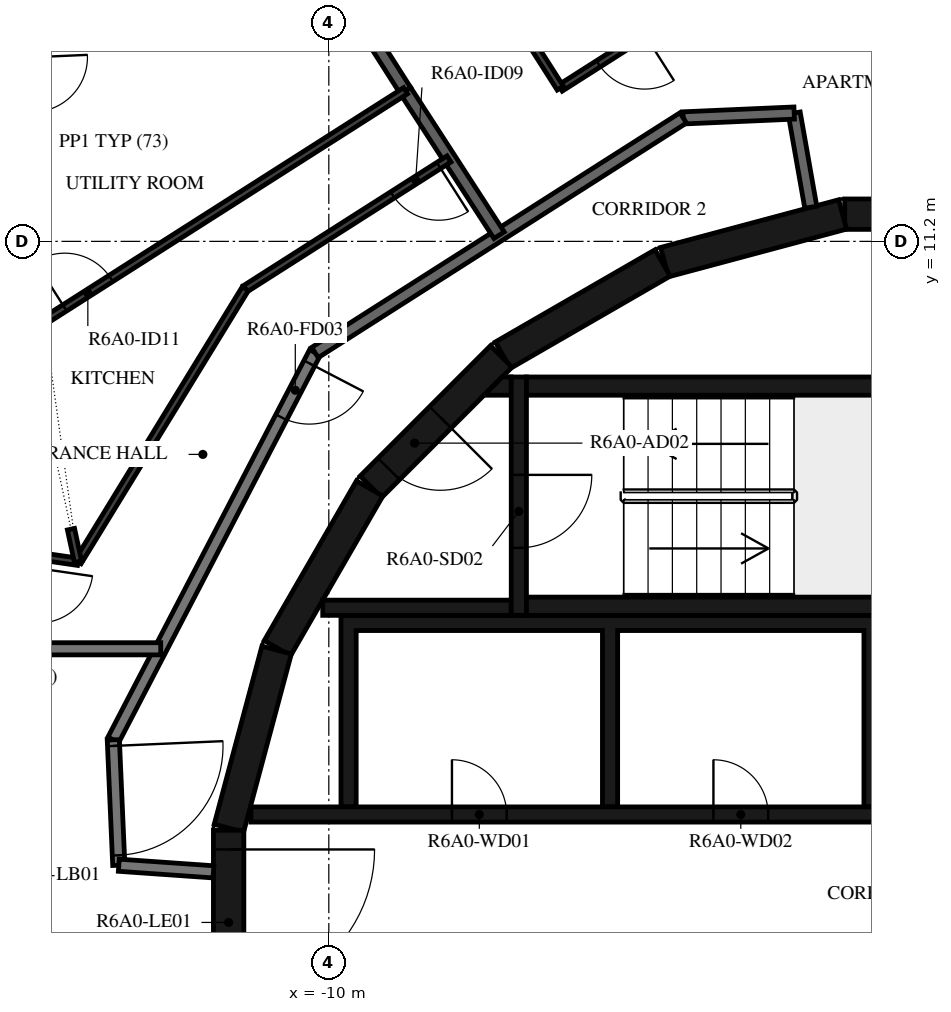
"""IFC4 building model, lengths in metres.
Left out: names, types, materials, properties, quantities, classifications, styles, units other than length and angle.
Written with IfcOpenShell. Run it as: python <this file> out.ifc"""

import sys

from ifc_helpers import new_model, si_unit, direction, frame, frame_2d, origin, place, context, subcontext, project, spatial, polyline, rectangle, outline, extrude, element, fill, save


model = new_model("IFC4")
c1 = context("Model", 3, precision=1e-05, world=origin(), true_north=direction((0.0, 1.0)))
c2 = subcontext(c1, "Body", "Model", "MODEL_VIEW")
j1 = project(units=[si_unit("LENGTHUNIT", "METRE"), si_unit("PLANEANGLEUNIT", "RADIAN")], contexts=[c1])
p1 = place(None, origin())
s1 = spatial("IfcSite", under=j1, at=p1, CompositionType="ELEMENT")
p2 = place(p1, origin())
s2 = spatial("IfcBuilding", under=s1, at=p2, CompositionType="ELEMENT")
p3 = place(p2, frame((0.0, 0.0, 233.7)))
s3 = spatial("IfcBuildingStorey", under=s2, at=p3, CompositionType="ELEMENT", Elevation=233.7)
for number, where, z_axis, x_axis in (
    (1, (1.516, 11.647, 0.0), (0.0, 0.0, 1.0), (-1.0, 0.0, 0.0)),
    (2, (-1.55, 11.643, 0.0), (0.0, 0.0, 1.0), (-0.966, -0.259, 0.0)),
    (3, (-4.51, 10.845, 0.0), (0.0, 0.0, 1.0), (-0.866, -0.5, 0.0)),
):
    element("IfcWall", number, at=place(p3, frame(where, z_axis=z_axis, x_axis=x_axis)), inside=s3, PredefinedType="SHEAR", context=c2, shape_type="SweptSolid", body=[
        extrude(rectangle(XDim=3.033, YDim=0.5, at=frame_2d((1.516, 0.0))), origin(), (0.0, 0.0, 1.0), 3.12),
    ])
p4 = place(p3, frame((-7.164, 9.308, 0.0), z_axis=(0.0, 0.0, 1.0), x_axis=(-0.707106781187, -0.707106781187, 0.0)))
e4 = element("IfcWall", 4, at=p4, inside=s3, PredefinedType="SHEAR", context=c2, shape_type="SweptSolid", body=[
    extrude(rectangle(XDim=3.032, YDim=0.5, at=frame_2d((1.516, 0.0))), origin(), (0.0, 0.0, 1.0), 3.12),
])
p5 = place(p4, frame((1.416, 0.0, 0.0)))
e5 = element("IfcOpeningElement", 5, at=p5, cuts=e4, PredefinedType="OPENING", context=c2, shape_type="SweptSolid", body=[
    extrude(rectangle(XDim=1.2, YDim=2.1, at=frame_2d((0.6, 1.05))), frame((0.0, 0.26, 0.0), z_axis=(0.0, -1.0, 0.0), x_axis=(1.0, 0.0, 0.0)), (0.0, 0.0, 1.0), 0.52),
])
for number, where, z_axis, x_axis in (
    (6, (-9.329, 7.137, 0.0), (0.0, 0.0, 1.0), (-0.5, -0.866, 0.0)),
    (7, (-10.858, 4.479, 0.0), (0.0, 0.0, 1.0), (-0.259, -0.966, 0.0)),
):
    element("IfcWall", number, at=place(p3, frame(where, z_axis=z_axis, x_axis=x_axis)), inside=s3, PredefinedType="SHEAR", context=c2, shape_type="SweptSolid", body=[
        extrude(rectangle(XDim=3.033, YDim=0.5, at=frame_2d((1.516, 0.0))), origin(), (0.0, 0.0, 1.0), 3.12),
    ])
p6 = place(p3, frame((-11.647, 1.516, 0.0), z_axis=(0.0, 0.0, 1.0), x_axis=(0.0, -1.0, 0.0)))
e8 = element("IfcWall", 8, at=p6, inside=s3, PredefinedType="SHEAR", context=c2, shape_type="SweptSolid", body=[
    extrude(rectangle(XDim=3.033, YDim=0.5, at=frame_2d((1.516, 0.0))), origin(), (0.0, 0.0, 1.0), 3.12),
])
p7 = place(p6, frame((0.316, 0.0, 0.0)))
e9 = element("IfcOpeningElement", 9, at=p7, cuts=e8, PredefinedType="OPENING", context=c2, shape_type="SweptSolid", body=[
    extrude(rectangle(XDim=2.4, YDim=2.1, at=frame_2d((1.2, 1.05))), frame((0.0, 0.26, 0.0), z_axis=(0.0, -1.0, 0.0), x_axis=(1.0, 0.0, 0.0)), (0.0, 0.0, 1.0), 0.52),
])
for number, where, z_axis, x_axis in (
    (10, (-6.75, 5.2, 0.0), (0.0, 0.0, 1.0), (1.0, 0.0, 0.0)),
    (11, (-6.75, 8.82, 0.0), (0.0, 0.0, 1.0), (1.0, 0.0, 0.0)),
):
    element("IfcWall", number, at=place(p3, frame(where, z_axis=z_axis, x_axis=x_axis)), inside=s3, PredefinedType="SHEAR", context=c2, shape_type="SweptSolid", body=[
        extrude(rectangle(XDim=6.75, YDim=0.3, at=frame_2d((3.375, 0.0))), origin(), (0.0, 0.0, 1.0), 3.12),
    ])
p8 = place(p3, frame((-6.875, 8.97, 0.0), z_axis=(0.0, 0.0, 1.0), x_axis=(0.0, -1.0, 0.0)))
e12 = element("IfcWall", 12, at=p8, inside=s3, PredefinedType="SHEAR", context=c2, shape_type="SweptSolid", body=[
    extrude(rectangle(XDim=3.92, YDim=0.25, at=frame_2d((1.96, 0.0))), origin(), (0.0, 0.0, 1.0), 3.12),
])
p9 = place(p8, frame((1.61, 0.0, 0.0)))
e13 = element("IfcOpeningElement", 13, at=p9, cuts=e12, PredefinedType="OPENING", context=c2, shape_type="SweptSolid", body=[
    extrude(rectangle(XDim=1.2, YDim=2.1, at=frame_2d((0.6, 1.05))), frame((0.0, 0.135, 0.0), z_axis=(0.0, -1.0, 0.0), x_axis=(1.0, 0.0, 0.0)), (0.0, 0.0, 1.0), 0.27),
])
p10 = place(p3, frame((-7.0, 5.175, 0.0), z_axis=(0.0, 0.0, 1.0), x_axis=(-1.0, 0.0, 0.0)))
e14 = element("IfcWall", 14, at=p10, inside=s3, PredefinedType="SHEAR", context=c2, shape_type="SweptSolid", body=[
    extrude(rectangle(XDim=3.1, YDim=0.25, at=frame_2d((1.55, 0.0))), origin(), (0.0, 0.0, 1.0), 3.12),
])
p11 = place(p3, origin())
e15 = element("IfcWall", 15, at=p11, inside=s3, PredefinedType="SHEAR", context=c2, shape_type="SweptSolid", body=[
    extrude(outline(polyline([(-7.148, 8.97), (-7.0, 8.97), (-7.0, 8.67), (-7.448, 8.67), (-7.148, 8.97)])), origin(), (0.0, 0.0, 1.0), 3.12),
])
p12 = place(p3, origin())
e16 = element("IfcWall", 16, at=p12, inside=s3, PredefinedType="SHEAR", context=c2, shape_type="SweptSolid", body=[
    extrude(outline(polyline([(-9.55, 4.8), (-5.5, 4.8), (-5.5, 1.9), (-5.25, 1.9), (-5.25, 4.8), (-1.2, 4.8), (-1.2, 1.9), (-0.95, 1.9), (-0.95, 4.8), (0.95, 4.8), (0.95, 1.9), (1.2, 1.9), (1.2, 4.8), (3.1, 4.8), (3.1, 1.9), (3.35, 1.9), (3.35, 4.8), (5.25, 4.8), (5.25, 1.9), (5.5, 1.9), (5.5, 4.8), (7.4, 4.8), (7.4, 1.9), (7.65, 1.9), (7.65, 4.8), (9.55, 4.8), (9.55, 1.9), (9.8, 1.9), (9.8, 4.8), (9.8, 5.05), (-9.8, 5.05), (-9.8, 4.8), (-9.8, 1.9), (-9.55, 1.9), (-9.55, 4.8)])), origin(), (0.0, 0.0, 1.0), 3.12),
])
p13 = place(p3, frame((-11.28, 1.775, 0.0), z_axis=(0.0, 0.0, 1.0), x_axis=(1.0, 0.0, 0.0)))
e17 = element("IfcWall", 17, at=p13, inside=s3, PredefinedType="SHEAR", context=c2, shape_type="SweptSolid", body=[
    extrude(rectangle(XDim=14.38, YDim=0.25, at=frame_2d((7.19, 0.0))), origin(), (0.0, 0.0, 1.0), 3.12),
])
p14 = place(p13, frame((10.73, 0.0, 0.0)))
e18 = element("IfcOpeningElement", 18, at=p14, cuts=e17, PredefinedType="OPENING", context=c2, shape_type="SweptSolid", body=[
    extrude(rectangle(XDim=1.1, YDim=2.1, at=frame_2d((0.55, 1.05))), frame((0.0, 0.135, 0.0), z_axis=(0.0, -1.0, 0.0), x_axis=(1.0, 0.0, 0.0)), (0.0, 0.0, 1.0), 0.27),
])
p15 = place(p13, frame((12.88, 0.0, 0.0)))
e19 = element("IfcOpeningElement", 19, at=p15, cuts=e17, PredefinedType="OPENING", context=c2, shape_type="SweptSolid", body=[
    extrude(rectangle(XDim=1.1, YDim=2.1, at=frame_2d((0.55, 1.05))), frame((0.0, 0.135, 0.0), z_axis=(0.0, -1.0, 0.0), x_axis=(1.0, 0.0, 0.0)), (0.0, 0.0, 1.0), 0.27),
])
p16 = place(p13, frame((3.305, 0.0, 0.0)))
e20 = element("IfcOpeningElement", 20, at=p16, cuts=e17, PredefinedType="OPENING", context=c2, shape_type="SweptSolid", body=[
    extrude(rectangle(XDim=0.9, YDim=2.1, at=frame_2d((0.45, 1.05))), frame((0.0, 0.135, 0.0), z_axis=(0.0, -1.0, 0.0), x_axis=(1.0, 0.0, 0.0)), (0.0, 0.0, 1.0), 0.27),
])
p17 = place(p13, frame((7.605, 0.0, 0.0)))
e21 = element("IfcOpeningElement", 21, at=p17, cuts=e17, PredefinedType="OPENING", context=c2, shape_type="SweptSolid", body=[
    extrude(rectangle(XDim=0.9, YDim=2.1, at=frame_2d((0.45, 1.05))), frame((0.0, 0.135, 0.0), z_axis=(0.0, -1.0, 0.0), x_axis=(1.0, 0.0, 0.0)), (0.0, 0.0, 1.0), 0.27),
])
p18 = place(p3, frame((-10.228, 9.372, 0.0), z_axis=(0.0, 0.0, 1.0), x_axis=(-0.461759464021, -0.887005184532, 0.0)))
e22 = element("IfcWall", 22, at=p18, inside=s3, PredefinedType="STANDARD", context=c2, shape_type="SweptSolid", body=[
    extrude(rectangle(XDim=7.181, YDim=0.2, at=frame_2d((3.591, 0.0))), origin(), (0.0, 0.0, 1.0), 3.12),
])
p19 = place(p18, frame((0.2, 0.0, 0.0)))
e23 = element("IfcOpeningElement", 23, at=p19, cuts=e22, PredefinedType="OPENING", context=c2, shape_type="SweptSolid", body=[
    extrude(rectangle(XDim=1.0, YDim=2.1, at=frame_2d((0.5, 1.05))), frame((0.0, 0.11, 0.0), z_axis=(0.0, -1.0, 0.0), x_axis=(1.0, 0.0, 0.0)), (0.0, 0.0, 1.0), 0.22),
])
p20 = place(p3, frame((-13.544, 3.003, 0.0), z_axis=(0.0, 0.0, 1.0), x_axis=(0.043652842459, -0.99904676034, 0.0)))
e24 = element("IfcWall", 24, at=p20, inside=s3, PredefinedType="STANDARD", context=c2, shape_type="SweptSolid", body=[
    extrude(rectangle(XDim=2.064, YDim=0.2, at=frame_2d((1.032, 0.0))), origin(), (0.0, 0.0, 1.0), 3.12),
])
p21 = place(p20, frame((0.1, 0.0, 0.0)))
e25 = element("IfcOpeningElement", 25, at=p21, cuts=e24, PredefinedType="OPENING", context=c2, shape_type="SweptSolid", body=[
    extrude(rectangle(XDim=1.8, YDim=2.1, at=frame_2d((0.9, 1.05))), frame((0.0, 0.11, 0.0), z_axis=(0.0, -1.0, 0.0), x_axis=(1.0, 0.0, 0.0)), (0.0, 0.0, 1.0), 0.22),
])
p22 = place(p3, frame((-13.454, 0.941, 0.0), z_axis=(0.0, 0.0, 1.0), x_axis=(0.99755155062, -0.069934997354, 0.0)))
e26 = element("IfcWall", 26, at=p22, inside=s3, PredefinedType="STANDARD", context=c2, shape_type="SweptSolid", body=[
    extrude(rectangle(XDim=1.561, YDim=0.2, at=frame_2d((0.78, 0.0))), origin(), (0.0, 0.0, 1.0), 3.12),
])
p23 = place(p3, frame((-2.074, 11.761, 0.0), z_axis=(0.0, 0.0, 1.0), x_axis=(-0.173679082312, 0.984802303189, 0.0)))
e27 = element("IfcWall", 27, at=p23, inside=s3, PredefinedType="STANDARD", context=c2, shape_type="SweptSolid", body=[
    extrude(rectangle(XDim=1.573, YDim=0.2, at=frame_2d((0.787, 0.0))), origin(), (0.0, 0.0, 1.0), 3.12),
])
p24 = place(p3, frame((-2.347, 13.31, 0.0), z_axis=(0.0, 0.0, 1.0), x_axis=(-0.999050095671, -0.043576442492, 0.0)))
e28 = element("IfcWall", 28, at=p24, inside=s3, PredefinedType="STANDARD", context=c2, shape_type="SweptSolid", body=[
    extrude(rectangle(XDim=1.826, YDim=0.2, at=frame_2d((0.913, 0.0))), origin(), (0.0, 0.0, 1.0), 3.12),
])
p25 = place(p3, frame((-4.172, 13.231, 0.0), z_axis=(0.0, 0.0, 1.0), x_axis=(-0.843388394728, -0.537304397561, 0.0)))
e29 = element("IfcWall", 29, at=p25, inside=s3, PredefinedType="STANDARD", context=c2, shape_type="SweptSolid", body=[
    extrude(rectangle(XDim=7.181, YDim=0.2, at=frame_2d((3.59, 0.0))), origin(), (0.0, 0.0, 1.0), 3.12),
])
p26 = place(p3, frame((-12.764, 4.5, 0.0), z_axis=(0.0, 0.0, 1.0), x_axis=(-1.0, 0.0, 0.0)))
e30 = element("IfcWall", 30, at=p26, inside=s3, PredefinedType="STANDARD", context=c2, shape_type="SweptSolid", body=[
    extrude(rectangle(XDim=5.135, YDim=0.2, at=frame_2d((2.568, 0.0))), origin(), (0.0, 0.0, 1.0), 3.12),
])
p27 = place(p3, frame((-8.738, 13.677, 0.0), z_axis=(0.0, 0.0, 1.0), x_axis=(0.54358037296, -0.839357121929, 0.0)))
e31 = element("IfcWall", 31, at=p27, inside=s3, PredefinedType="STANDARD", context=c2, shape_type="SweptSolid", body=[
    extrude(rectangle(XDim=2.83, YDim=0.2, at=frame_2d((1.415, 0.0))), origin(), (0.0, 0.0, 1.0), 3.12),
])
p28 = place(p3, frame((-9.663, 15.129, 0.0), z_axis=(0.0, 0.0, 1.0), x_axis=(0.537205715853, -0.843451254581, 0.0)))
e32 = element("IfcWall", 32, at=p28, inside=s3, PredefinedType="STANDARD", context=c2, shape_type="SweptSolid", body=[
    extrude(rectangle(XDim=1.722, YDim=0.2, at=frame_2d((0.861, 0.0))), origin(), (0.0, 0.0, 1.0), 3.12),
])
p29 = place(p3, frame((-4.639, 14.712, 0.0), z_axis=(0.0, 0.0, 1.0), x_axis=(-0.843361471414, -0.537346655833, 0.0)))
e33 = element("IfcWall", 33, at=p29, inside=s3, PredefinedType="PARTITIONING", context=c2, shape_type="SweptSolid", body=[
    extrude(rectangle(XDim=1.844, YDim=0.12, at=frame_2d((0.922, 0.0))), origin(), (0.0, 0.0, 1.0), 3.12),
])
p30 = place(p29, frame((0.2, 0.0, 0.0)))
e34 = element("IfcOpeningElement", 34, at=p30, cuts=e33, PredefinedType="OPENING", context=c2, shape_type="SweptSolid", body=[
    extrude(rectangle(XDim=0.9, YDim=2.1, at=frame_2d((0.45, 1.05))), frame((0.0, 0.07, 0.0), z_axis=(0.0, -1.0, 0.0), x_axis=(1.0, 0.0, 0.0)), (0.0, 0.0, 1.0), 0.14),
])
p31 = place(p3, frame((-6.194, 13.721, 0.0), z_axis=(0.0, 0.0, 1.0), x_axis=(-0.537316807294, 0.843380488629, 0.0)))
e35 = element("IfcWall", 35, at=p31, inside=s3, PredefinedType="PARTITIONING", context=c2, shape_type="SweptSolid", body=[
    extrude(rectangle(XDim=4.331, YDim=0.12, at=frame_2d((2.165, 0.0))), origin(), (0.0, 0.0, 1.0), 3.12),
])
p32 = place(p3, frame((-8.023, 12.555, 0.0), z_axis=(0.0, 0.0, 1.0), x_axis=(-0.843408270233, -0.537273198385, 0.0)))
e36 = element("IfcWall", 36, at=p32, inside=s3, PredefinedType="PARTITIONING", context=c2, shape_type="SweptSolid", body=[
    extrude(rectangle(XDim=3.971, YDim=0.12, at=frame_2d((1.986, 0.0))), origin(), (0.0, 0.0, 1.0), 3.12),
])
p33 = place(p32, frame((0.2, 0.0, 0.0)))
e37 = element("IfcOpeningElement", 37, at=p33, cuts=e36, PredefinedType="OPENING", context=c2, shape_type="SweptSolid", body=[
    extrude(rectangle(XDim=0.9, YDim=2.1, at=frame_2d((0.45, 1.05))), frame((0.0, 0.07, 0.0), z_axis=(0.0, -1.0, 0.0), x_axis=(1.0, 0.0, 0.0)), (0.0, 0.0, 1.0), 0.14),
])
p34 = place(p3, frame((-11.373, 10.421, 0.0), z_axis=(0.0, 0.0, 1.0), x_axis=(-0.522435957358, -0.852678527031, 0.0)))
e38 = element("IfcWall", 38, at=p34, inside=s3, PredefinedType="PARTITIONING", context=c2, shape_type="SweptSolid", body=[
    extrude(rectangle(XDim=5.267, YDim=0.12, at=frame_2d((2.633, 0.0))), origin(), (0.0, 0.0, 1.0), 3.12),
])
p35 = place(p3, frame((-14.125, 5.931, 0.0), z_axis=(0.0, 0.0, 1.0), x_axis=(-0.989621518838, 0.143698467119, 0.0)))
e39 = element("IfcWall", 39, at=p35, inside=s3, PredefinedType="PARTITIONING", context=c2, shape_type="SweptSolid", body=[
    extrude(rectangle(XDim=0.63, YDim=0.12, at=frame_2d((0.315, 0.0))), origin(), (0.0, 0.0, 1.0), 3.12),
])
p36 = place(p3, frame((-14.68, 9.891, 0.0), z_axis=(0.0, 0.0, 1.0), x_axis=(0.843391697183, 0.537299213774, 0.0)))
e40 = element("IfcWall", 40, at=p36, inside=s3, PredefinedType="PARTITIONING", context=c2, shape_type="SweptSolid", body=[
    extrude(rectangle(XDim=7.045, YDim=0.12, at=frame_2d((3.522, 0.0))), origin(), (0.0, 0.0, 1.0), 3.12),
])
p37 = place(p36, frame((0.4, 0.0, 0.0)))
e41 = element("IfcOpeningElement", 41, at=p37, cuts=e40, PredefinedType="OPENING", context=c2, shape_type="SweptSolid", body=[
    extrude(rectangle(XDim=0.9, YDim=2.1, at=frame_2d((0.45, 1.05))), frame((0.0, 0.07, 0.0), z_axis=(0.0, -1.0, 0.0), x_axis=(1.0, 0.0, 0.0)), (0.0, 0.0, 1.0), 0.14),
])
p38 = place(p3, frame((-14.24, 6.467, 0.0), z_axis=(0.0, 0.0, 1.0), x_axis=(0.210896225868, -0.977508456186, 0.0)))
e42 = element("IfcWall", 42, at=p38, inside=s3, PredefinedType="PARTITIONING", context=c2, shape_type="SweptSolid", body=[
    extrude(rectangle(XDim=0.549, YDim=0.12, at=frame_2d((0.274, 0.0))), origin(), (0.0, 0.0, 1.0), 3.12),
])
p39 = place(p9, origin())
e43 = element("IfcDoor", 43, at=p39, inside=s3, OperationType="SINGLE_SWING_LEFT", PredefinedType="DOOR", context=c2, shape_type="SweptSolid", body=[
    extrude(rectangle(XDim=1.2, YDim=2.1, at=frame_2d((0.6, 1.05))), frame((0.0, 0.025, 0.0), z_axis=(0.0, -1.0, 0.0), x_axis=(1.0, 0.0, 0.0)), (0.0, 0.0, 1.0), 0.05),
])
fill(e13, e43)
p40 = place(p5, origin())
e44 = element("IfcDoor", 44, at=p40, inside=s3, OperationType="SINGLE_SWING_RIGHT", PredefinedType="DOOR", context=c2, shape_type="SweptSolid", body=[
    extrude(rectangle(XDim=1.2, YDim=2.1, at=frame_2d((0.6, 1.05))), frame((0.0, 0.025, 0.0), z_axis=(0.0, -1.0, 0.0), x_axis=(1.0, 0.0, 0.0)), (0.0, 0.0, 1.0), 0.05),
])
fill(e5, e44)
p41 = place(p7, origin())
e45 = element("IfcDoor", 45, at=p41, inside=s3, OperationType="DOUBLE_DOOR_SINGLE_SWING", PredefinedType="DOOR", context=c2, shape_type="SweptSolid", body=[
    extrude(rectangle(XDim=2.4, YDim=2.1, at=frame_2d((1.2, 1.05))), frame((0.0, 0.025, 0.0), z_axis=(0.0, -1.0, 0.0), x_axis=(1.0, 0.0, 0.0)), (0.0, 0.0, 1.0), 0.05),
])
fill(e9, e45)
p42 = place(p16, origin())
e46 = element("IfcDoor", 46, at=p42, inside=s3, OperationType="SINGLE_SWING_LEFT", PredefinedType="DOOR", context=c2, shape_type="SweptSolid", body=[
    extrude(rectangle(XDim=0.9, YDim=2.1, at=frame_2d((0.45, 1.05))), frame((0.0, 0.025, 0.0), z_axis=(0.0, -1.0, 0.0), x_axis=(1.0, 0.0, 0.0)), (0.0, 0.0, 1.0), 0.05),
])
fill(e20, e46)
p43 = place(p17, origin())
e47 = element("IfcDoor", 47, at=p43, inside=s3, OperationType="SINGLE_SWING_RIGHT", PredefinedType="DOOR", context=c2, shape_type="SweptSolid", body=[
    extrude(rectangle(XDim=0.9, YDim=2.1, at=frame_2d((0.45, 1.05))), frame((0.0, 0.025, 0.0), z_axis=(0.0, -1.0, 0.0), x_axis=(1.0, 0.0, 0.0)), (0.0, 0.0, 1.0), 0.05),
])
fill(e21, e47)
p44 = place(p30, origin())
e48 = element("IfcDoor", 48, at=p44, inside=s3, OperationType="SINGLE_SWING_RIGHT", PredefinedType="DOOR", context=c2, shape_type="SweptSolid", body=[
    extrude(rectangle(XDim=0.9, YDim=2.1, at=frame_2d((0.45, 1.05))), frame((0.0, 0.025, 0.0), z_axis=(0.0, -1.0, 0.0), x_axis=(1.0, 0.0, 0.0)), (0.0, 0.0, 1.0), 0.05),
])
fill(e34, e48)
p45 = place(p19, origin())
e49 = element("IfcDoor", 49, at=p45, inside=s3, OperationType="SINGLE_SWING_LEFT", PredefinedType="DOOR", context=c2, shape_type="SweptSolid", body=[
    extrude(rectangle(XDim=1.0, YDim=2.1, at=frame_2d((0.5, 1.05))), frame((0.0, 0.025, 0.0), z_axis=(0.0, -1.0, 0.0), x_axis=(1.0, 0.0, 0.0)), (0.0, 0.0, 1.0), 0.05),
])
fill(e23, e49)
p46 = place(p33, origin())
e50 = element("IfcDoor", 50, at=p46, inside=s3, OperationType="SINGLE_SWING_LEFT", PredefinedType="DOOR", context=c2, shape_type="SweptSolid", body=[
    extrude(rectangle(XDim=0.9, YDim=2.1, at=frame_2d((0.45, 1.05))), frame((0.0, 0.025, 0.0), z_axis=(0.0, -1.0, 0.0), x_axis=(1.0, 0.0, 0.0)), (0.0, 0.0, 1.0), 0.05),
])
fill(e37, e50)
p47 = place(p37, origin())
e51 = element("IfcDoor", 51, at=p47, inside=s3, OperationType="SINGLE_SWING_LEFT", PredefinedType="DOOR", context=c2, shape_type="SweptSolid", body=[
    extrude(rectangle(XDim=0.9, YDim=2.1, at=frame_2d((0.45, 1.05))), frame((0.0, 0.025, 0.0), z_axis=(0.0, -1.0, 0.0), x_axis=(1.0, 0.0, 0.0)), (0.0, 0.0, 1.0), 0.05),
])
fill(e41, e51)
p48 = place(p21, origin())
e52 = element("IfcDoor", 52, at=p48, inside=s3, OperationType="DOUBLE_DOOR_SINGLE_SWING", PredefinedType="DOOR", context=c2, shape_type="SweptSolid", body=[
    extrude(rectangle(XDim=1.8, YDim=2.1, at=frame_2d((0.9, 1.05))), frame((0.0, 0.025, 0.0), z_axis=(0.0, -1.0, 0.0), x_axis=(1.0, 0.0, 0.0)), (0.0, 0.0, 1.0), 0.05),
])
fill(e25, e52)
save(model, sys.argv[1])
